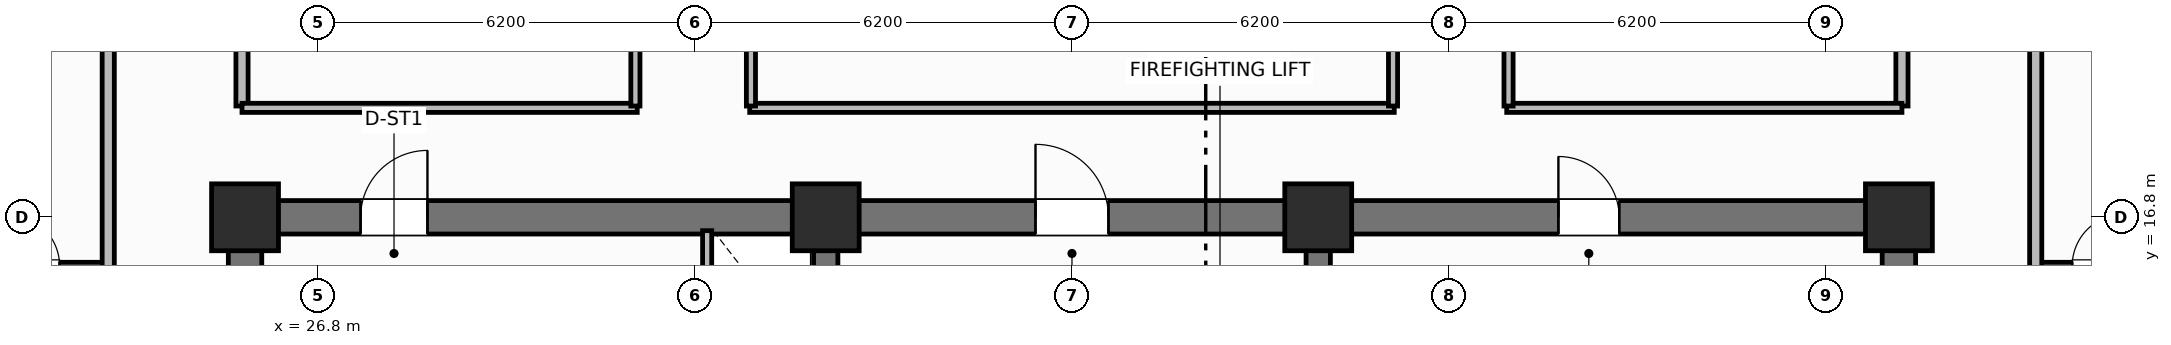
"""IFC4 building model, lengths in metres.
Left out: names, types, materials, properties, quantities, classifications, styles, units other than length and angle.
Written with IfcOpenShell. Run it as: python <this file> out.ifc"""

import sys

from ifc_helpers import new_model, si_unit, direction, frame, frame_2d, origin, origin_2d, place, context, subcontext, project, spatial, rectangle, extrude, element, fill, save


model = new_model("IFC4")
c1 = context("Model", 3, precision=1e-05, world=origin(), true_north=direction((0.0, 1.0)))
c2 = subcontext(c1, "Body", "Model", "MODEL_VIEW")
j1 = project(units=[si_unit("LENGTHUNIT", "METRE"), si_unit("PLANEANGLEUNIT", "RADIAN")], contexts=[c1])
p1 = place(None, origin())
s1 = spatial("IfcSite", under=j1, at=p1, CompositionType="ELEMENT")
p2 = place(p1, origin())
s2 = spatial("IfcBuilding", under=s1, at=p2, CompositionType="ELEMENT")
p3 = place(p2, frame((0.0, 0.0, 92.0)))
s3 = spatial("IfcBuildingStorey", under=s2, at=p3, CompositionType="ELEMENT", Elevation=92.0)
for number, where, z_axis, x_axis in (
    (1, (25.6, 10.875, 0.0), (0.0, 0.0, 1.0), (0.0, 1.0, 0.0)),
    (2, (52.8, 10.875, 0.0), (0.0, 0.0, 1.0), (0.0, 1.0, 0.0)),
):
    element("IfcWall", number, at=place(p3, frame(where, z_axis=z_axis, x_axis=x_axis)), inside=s3, PredefinedType="SHEAR", context=c2, shape_type="SweptSolid", body=[
        extrude(rectangle(XDim=5.65, YDim=0.55, at=frame_2d((2.825, 0.0))), origin(), (0.0, 0.0, 1.0), 3.7),
    ])
p4 = place(p3, frame((25.6, 16.8, 0.0), z_axis=(0.0, 0.0, 1.0), x_axis=(1.0, 0.0, 0.0)))
e3 = element("IfcWall", 3, at=p4, inside=s3, PredefinedType="SHEAR", context=c2, shape_type="SweptSolid", body=[
    extrude(rectangle(XDim=27.2, YDim=0.55, at=frame_2d((13.6, 0.0))), origin(), (0.0, 0.0, 1.0), 3.7),
])
p5 = place(p4, frame((1.9, 0.0, 0.0)))
e4 = element("IfcOpeningElement", 4, at=p5, cuts=e3, PredefinedType="OPENING", context=c2, shape_type="SweptSolid", body=[
    extrude(rectangle(XDim=1.1, YDim=2.15, at=frame_2d((0.55, 1.075))), frame((0.0, 0.285, 0.0), z_axis=(0.0, -1.0, 0.0), x_axis=(1.0, 0.0, 0.0)), (0.0, 0.0, 1.0), 0.57),
])
p6 = place(p4, frame((13.0, 0.0, 0.0)))
e5 = element("IfcOpeningElement", 5, at=p6, cuts=e3, PredefinedType="OPENING", context=c2, shape_type="SweptSolid", body=[
    extrude(rectangle(XDim=1.2, YDim=2.15, at=frame_2d((0.6, 1.075))), frame((0.0, 0.285, 0.0), z_axis=(0.0, -1.0, 0.0), x_axis=(1.0, 0.0, 0.0)), (0.0, 0.0, 1.0), 0.57),
])
p7 = place(p4, frame((21.6, 0.0, 0.0)))
e6 = element("IfcOpeningElement", 6, at=p7, cuts=e3, PredefinedType="OPENING", context=c2, shape_type="SweptSolid", body=[
    extrude(rectangle(XDim=1.0, YDim=2.15, at=frame_2d((0.5, 1.075))), frame((0.0, 0.285, 0.0), z_axis=(0.0, -1.0, 0.0), x_axis=(1.0, 0.0, 0.0)), (0.0, 0.0, 1.0), 0.57),
])
for number, where, z_axis, x_axis in (
    (7, (35.15, 10.875, 0.0), (0.0, 0.0, 1.0), (0.0, 1.0, 0.0)),
    (8, (43.25, 10.875, 0.0), (0.0, 0.0, 1.0), (0.0, 1.0, 0.0)),
):
    element("IfcWall", number, at=place(p3, frame(where, z_axis=z_axis, x_axis=x_axis)), inside=s3, PredefinedType="SHEAR", context=c2, shape_type="SweptSolid", body=[
        extrude(rectangle(XDim=5.65, YDim=0.4, at=frame_2d((2.825, 0.0))), origin(), (0.0, 0.0, 1.0), 3.7),
    ])
for number, where, z_axis, x_axis in (
    (9, (25.6, 16.8, 0.0), (0.0, 0.0, 1.0), (1.0, 0.0, 0.0)),
    (10, (35.15, 16.8, 0.0), (0.0, 0.0, 1.0), (1.0, 0.0, 0.0)),
    (11, (43.25, 16.8, 0.0), (0.0, 0.0, 1.0), (1.0, 0.0, 0.0)),
    (12, (52.8, 16.8, 0.0), (0.0, 0.0, 1.0), (1.0, 0.0, 0.0)),
):
    element("IfcColumn", number, at=place(p3, frame(where, z_axis=z_axis, x_axis=x_axis)), inside=s3, PredefinedType="COLUMN", context=c2, shape_type="SweptSolid", body=[
        extrude(rectangle(XDim=1.1, YDim=1.1, at=origin_2d()), origin(), (0.0, 0.0, 1.0), 3.7),
    ])
p8 = place(p3, frame((33.2, 14.5, 0.0), z_axis=(0.0, 0.0, 1.0), x_axis=(0.0, 1.0, 0.0)))
e13 = element("IfcWall", 13, at=p8, inside=s3, PredefinedType="PARTITIONING", context=c2, shape_type="SweptSolid", body=[
    extrude(rectangle(XDim=2.08, YDim=0.15, at=frame_2d((1.04, 0.0))), origin(), (0.0, 0.0, 1.0), 2.53),
])
p9 = place(p8, frame((0.55, 0.0, 0.0)))
e14 = element("IfcOpeningElement", 14, at=p9, cuts=e13, PredefinedType="OPENING", context=c2, shape_type="SweptSolid", body=[
    extrude(rectangle(XDim=0.85, YDim=2.05, at=frame_2d((0.425, 1.025))), frame((0.0, 0.085, 0.0), z_axis=(0.0, -1.0, 0.0), x_axis=(1.0, 0.0, 0.0)), (0.0, 0.0, 1.0), 0.17),
])
for number, where, z_axis, x_axis in (
    (15, (25.55, 18.63, 0.0), (0.0, 0.0, 1.0), (0.0, 1.0, 0.0)),
    (16, (52.85, 18.63, 0.0), (0.0, 0.0, 1.0), (0.0, 1.0, 0.0)),
):
    element("IfcWall", number, at=place(p3, frame(where, z_axis=z_axis, x_axis=x_axis)), inside=s3, PredefinedType="PARTITIONING", context=c2, shape_type="SweptSolid", body=[
        extrude(rectangle(XDim=19.14, YDim=0.2, at=frame_2d((9.57, 0.0))), origin(), (0.0, 0.0, 1.0), 2.53),
    ])
p10 = place(p3, frame((25.55, 18.6, 0.0), z_axis=(0.0, 0.0, 1.0), x_axis=(1.0, 0.0, 0.0)))
e17 = element("IfcWall", 17, at=p10, inside=s3, PredefinedType="PARTITIONING", context=c2, shape_type="SweptSolid", body=[
    extrude(rectangle(XDim=6.5, YDim=0.15, at=frame_2d((3.25, 0.0))), origin(), (0.0, 0.0, 1.0), 2.53),
])
p11 = place(p3, frame((33.9, 18.6, 0.0), z_axis=(0.0, 0.0, 1.0), x_axis=(1.0, 0.0, 0.0)))
e18 = element("IfcWall", 18, at=p11, inside=s3, PredefinedType="PARTITIONING", context=c2, shape_type="SweptSolid", body=[
    extrude(rectangle(XDim=10.6, YDim=0.15, at=frame_2d((5.3, 0.0))), origin(), (0.0, 0.0, 1.0), 2.53),
])
p12 = place(p3, frame((46.35, 18.6, 0.0), z_axis=(0.0, 0.0, 1.0), x_axis=(1.0, 0.0, 0.0)))
e19 = element("IfcWall", 19, at=p12, inside=s3, PredefinedType="PARTITIONING", context=c2, shape_type="SweptSolid", body=[
    extrude(rectangle(XDim=6.5, YDim=0.15, at=frame_2d((3.25, 0.0))), origin(), (0.0, 0.0, 1.0), 2.53),
])
p13 = place(p3, frame((32.02, 18.63, 0.0), z_axis=(0.0, 0.0, 1.0), x_axis=(0.0, 1.0, 0.0)))
e20 = element("IfcWall", 20, at=p13, inside=s3, PredefinedType="PARTITIONING", context=c2, shape_type="SweptSolid", body=[
    extrude(rectangle(XDim=19.14, YDim=0.15, at=frame_2d((9.57, 0.0))), origin(), (0.0, 0.0, 1.0), 2.53),
])
p14 = place(p13, frame((3.0, 0.0, 0.0)))
e21 = element("IfcOpeningElement", 21, at=p14, cuts=e20, PredefinedType="OPENING", context=c2, shape_type="SweptSolid", body=[
    extrude(rectangle(XDim=0.9, YDim=2.1, at=frame_2d((0.45, 1.05))), frame((0.0, 0.085, 0.0), z_axis=(0.0, -1.0, 0.0), x_axis=(1.0, 0.0, 0.0)), (0.0, 0.0, 1.0), 0.17),
])
p15 = place(p13, frame((11.5, 0.0, 0.0)))
e22 = element("IfcOpeningElement", 22, at=p15, cuts=e20, PredefinedType="OPENING", context=c2, shape_type="SweptSolid", body=[
    extrude(rectangle(XDim=0.9, YDim=2.1, at=frame_2d((0.45, 1.05))), frame((0.0, 0.085, 0.0), z_axis=(0.0, -1.0, 0.0), x_axis=(1.0, 0.0, 0.0)), (0.0, 0.0, 1.0), 0.17),
])
p16 = place(p3, frame((33.92, 18.63, 0.0), z_axis=(0.0, 0.0, 1.0), x_axis=(0.0, 1.0, 0.0)))
e23 = element("IfcWall", 23, at=p16, inside=s3, PredefinedType="PARTITIONING", context=c2, shape_type="SweptSolid", body=[
    extrude(rectangle(XDim=19.14, YDim=0.15, at=frame_2d((9.57, 0.0))), origin(), (0.0, 0.0, 1.0), 2.53),
])
p17 = place(p16, frame((2.4, 0.0, 0.0)))
e24 = element("IfcOpeningElement", 24, at=p17, cuts=e23, PredefinedType="OPENING", context=c2, shape_type="SweptSolid", body=[
    extrude(rectangle(XDim=0.9, YDim=2.1, at=frame_2d((0.45, 1.05))), frame((0.0, 0.085, 0.0), z_axis=(0.0, -1.0, 0.0), x_axis=(1.0, 0.0, 0.0)), (0.0, 0.0, 1.0), 0.17),
])
p18 = place(p3, frame((44.48, 18.63, 0.0), z_axis=(0.0, 0.0, 1.0), x_axis=(0.0, 1.0, 0.0)))
e25 = element("IfcWall", 25, at=p18, inside=s3, PredefinedType="PARTITIONING", context=c2, shape_type="SweptSolid", body=[
    extrude(rectangle(XDim=19.14, YDim=0.15, at=frame_2d((9.57, 0.0))), origin(), (0.0, 0.0, 1.0), 2.53),
])
p19 = place(p18, frame((8.89, 0.0, 0.0)))
e26 = element("IfcOpeningElement", 26, at=p19, cuts=e25, PredefinedType="OPENING", context=c2, shape_type="SweptSolid", body=[
    extrude(rectangle(XDim=0.9, YDim=2.1, at=frame_2d((0.45, 1.05))), frame((0.0, 0.085, 0.0), z_axis=(0.0, -1.0, 0.0), x_axis=(1.0, 0.0, 0.0)), (0.0, 0.0, 1.0), 0.17),
])
p20 = place(p3, frame((46.38, 18.63, 0.0), z_axis=(0.0, 0.0, 1.0), x_axis=(0.0, 1.0, 0.0)))
e27 = element("IfcWall", 27, at=p20, inside=s3, PredefinedType="PARTITIONING", context=c2, shape_type="SweptSolid", body=[
    extrude(rectangle(XDim=19.14, YDim=0.15, at=frame_2d((9.57, 0.0))), origin(), (0.0, 0.0, 1.0), 2.53),
])
p21 = place(p20, frame((5.5, 0.0, 0.0)))
e28 = element("IfcOpeningElement", 28, at=p21, cuts=e27, PredefinedType="OPENING", context=c2, shape_type="SweptSolid", body=[
    extrude(rectangle(XDim=1.0, YDim=2.15, at=frame_2d((0.5, 1.075))), frame((0.0, 0.085, 0.0), z_axis=(0.0, -1.0, 0.0), x_axis=(1.0, 0.0, 0.0)), (0.0, 0.0, 1.0), 0.17),
])
p22 = place(p3, frame((21.1, 16.0, 0.0), z_axis=(0.0, 0.0, 1.0), x_axis=(1.0, 0.0, 0.0)))
e29 = element("IfcWall", 29, at=p22, inside=s3, PredefinedType="PARTITIONING", context=c2, shape_type="SweptSolid", body=[
    extrude(rectangle(XDim=2.25, YDim=0.12, at=frame_2d((1.125, 0.0))), origin(), (0.0, 0.0, 1.0), 2.53),
])
p23 = place(p22, frame((0.6, 0.0, 0.0)))
e30 = element("IfcOpeningElement", 30, at=p23, cuts=e29, PredefinedType="OPENING", context=c2, shape_type="SweptSolid", body=[
    extrude(rectangle(XDim=0.85, YDim=2.1, at=frame_2d((0.425, 1.05))), frame((0.0, 0.07, 0.0), z_axis=(0.0, -1.0, 0.0), x_axis=(1.0, 0.0, 0.0)), (0.0, 0.0, 1.0), 0.14),
])
p24 = place(p3, frame((23.35, 10.6, 0.0), z_axis=(0.0, 0.0, 1.0), x_axis=(0.0, 1.0, 0.0)))
e31 = element("IfcWall", 31, at=p24, inside=s3, PredefinedType="PARTITIONING", context=c2, shape_type="SweptSolid", body=[
    extrude(rectangle(XDim=35.2, YDim=0.2, at=frame_2d((17.6, 0.0))), origin(), (0.0, 0.0, 1.0), 2.53),
])
p25 = place(p24, frame((2.65, 0.0, 0.0)))
e32 = element("IfcOpeningElement", 32, at=p25, cuts=e31, PredefinedType="OPENING", context=c2, shape_type="SweptSolid", body=[
    extrude(rectangle(XDim=1.0, YDim=2.15, at=frame_2d((0.5, 1.075))), frame((0.0, 0.11, 0.0), z_axis=(0.0, -1.0, 0.0), x_axis=(1.0, 0.0, 0.0)), (0.0, 0.0, 1.0), 0.22),
])
p26 = place(p24, frame((22.75, 0.0, 0.0)))
e33 = element("IfcOpeningElement", 33, at=p26, cuts=e31, PredefinedType="OPENING", context=c2, shape_type="SweptSolid", body=[
    extrude(rectangle(XDim=1.0, YDim=2.15, at=frame_2d((0.5, 1.075))), frame((0.0, 0.11, 0.0), z_axis=(0.0, -1.0, 0.0), x_axis=(1.0, 0.0, 0.0)), (0.0, 0.0, 1.0), 0.22),
])
p27 = place(p3, frame((55.05, 16.0, 0.0), z_axis=(0.0, 0.0, 1.0), x_axis=(1.0, 0.0, 0.0)))
e34 = element("IfcWall", 34, at=p27, inside=s3, PredefinedType="PARTITIONING", context=c2, shape_type="SweptSolid", body=[
    extrude(rectangle(XDim=2.25, YDim=0.12, at=frame_2d((1.125, 0.0))), origin(), (0.0, 0.0, 1.0), 2.53),
])
p28 = place(p27, frame((0.6, 0.0, 0.0)))
e35 = element("IfcOpeningElement", 35, at=p28, cuts=e34, PredefinedType="OPENING", context=c2, shape_type="SweptSolid", body=[
    extrude(rectangle(XDim=0.85, YDim=2.1, at=frame_2d((0.425, 1.05))), frame((0.0, 0.07, 0.0), z_axis=(0.0, -1.0, 0.0), x_axis=(1.0, 0.0, 0.0)), (0.0, 0.0, 1.0), 0.14),
])
p29 = place(p3, frame((55.05, 10.6, 0.0), z_axis=(0.0, 0.0, 1.0), x_axis=(0.0, 1.0, 0.0)))
e36 = element("IfcWall", 36, at=p29, inside=s3, PredefinedType="PARTITIONING", context=c2, shape_type="SweptSolid", body=[
    extrude(rectangle(XDim=35.2, YDim=0.2, at=frame_2d((17.6, 0.0))), origin(), (0.0, 0.0, 1.0), 2.53),
])
p30 = place(p29, frame((2.65, 0.0, 0.0)))
e37 = element("IfcOpeningElement", 37, at=p30, cuts=e36, PredefinedType="OPENING", context=c2, shape_type="SweptSolid", body=[
    extrude(rectangle(XDim=1.0, YDim=2.15, at=frame_2d((0.5, 1.075))), frame((0.0, 0.11, 0.0), z_axis=(0.0, -1.0, 0.0), x_axis=(1.0, 0.0, 0.0)), (0.0, 0.0, 1.0), 0.22),
])
p31 = place(p29, frame((11.814, 0.0, 0.0)))
e38 = element("IfcOpeningElement", 38, at=p31, cuts=e36, PredefinedType="OPENING", context=c2, shape_type="SweptSolid", body=[
    extrude(rectangle(XDim=1.0, YDim=2.15, at=frame_2d((0.5, 1.075))), frame((0.0, 0.11, 0.0), z_axis=(0.0, -1.0, 0.0), x_axis=(1.0, 0.0, 0.0)), (0.0, 0.0, 1.0), 0.22),
])
p32 = place(p29, frame((23.65, 0.0, 0.0)))
e39 = element("IfcOpeningElement", 39, at=p32, cuts=e36, PredefinedType="OPENING", context=c2, shape_type="SweptSolid", body=[
    extrude(rectangle(XDim=1.0, YDim=2.15, at=frame_2d((0.5, 1.075))), frame((0.0, 0.11, 0.0), z_axis=(0.0, -1.0, 0.0), x_axis=(1.0, 0.0, 0.0)), (0.0, 0.0, 1.0), 0.22),
])
p33 = place(p23, origin())
e40 = element("IfcDoor", 40, at=p33, inside=s3, OperationType="SINGLE_SWING_LEFT", PredefinedType="DOOR", context=c2, shape_type="SweptSolid", body=[
    extrude(rectangle(XDim=0.85, YDim=2.1, at=frame_2d((0.425, 1.05))), frame((0.0, 0.025, 0.0), z_axis=(0.0, -1.0, 0.0), x_axis=(1.0, 0.0, 0.0)), (0.0, 0.0, 1.0), 0.05),
])
fill(e30, e40)
p34 = place(p28, origin())
e41 = element("IfcDoor", 41, at=p34, inside=s3, OperationType="SINGLE_SWING_RIGHT", PredefinedType="DOOR", context=c2, shape_type="SweptSolid", body=[
    extrude(rectangle(XDim=0.85, YDim=2.1, at=frame_2d((0.425, 1.05))), frame((0.0, 0.025, 0.0), z_axis=(0.0, -1.0, 0.0), x_axis=(1.0, 0.0, 0.0)), (0.0, 0.0, 1.0), 0.05),
])
fill(e35, e41)
p35 = place(p5, origin())
e42 = element("IfcDoor", 42, at=p35, inside=s3, OperationType="SINGLE_SWING_RIGHT", PredefinedType="DOOR", context=c2, shape_type="SweptSolid", body=[
    extrude(rectangle(XDim=1.1, YDim=2.15, at=frame_2d((0.55, 1.075))), frame((0.0, 0.025, 0.0), z_axis=(0.0, -1.0, 0.0), x_axis=(1.0, 0.0, 0.0)), (0.0, 0.0, 1.0), 0.05),
])
fill(e4, e42)
p36 = place(p6, origin())
e43 = element("IfcDoor", 43, at=p36, inside=s3, OperationType="SINGLE_SWING_LEFT", PredefinedType="DOOR", context=c2, shape_type="SweptSolid", body=[
    extrude(rectangle(XDim=1.2, YDim=2.15, at=frame_2d((0.6, 1.075))), frame((0.0, 0.025, 0.0), z_axis=(0.0, -1.0, 0.0), x_axis=(1.0, 0.0, 0.0)), (0.0, 0.0, 1.0), 0.05),
])
fill(e5, e43)
p37 = place(p7, origin())
e44 = element("IfcDoor", 44, at=p37, inside=s3, OperationType="SINGLE_SWING_LEFT", PredefinedType="DOOR", context=c2, shape_type="SweptSolid", body=[
    extrude(rectangle(XDim=1.0, YDim=2.15, at=frame_2d((0.5, 1.075))), frame((0.0, 0.025, 0.0), z_axis=(0.0, -1.0, 0.0), x_axis=(1.0, 0.0, 0.0)), (0.0, 0.0, 1.0), 0.05),
])
fill(e6, e44)
save(model, sys.argv[1])
